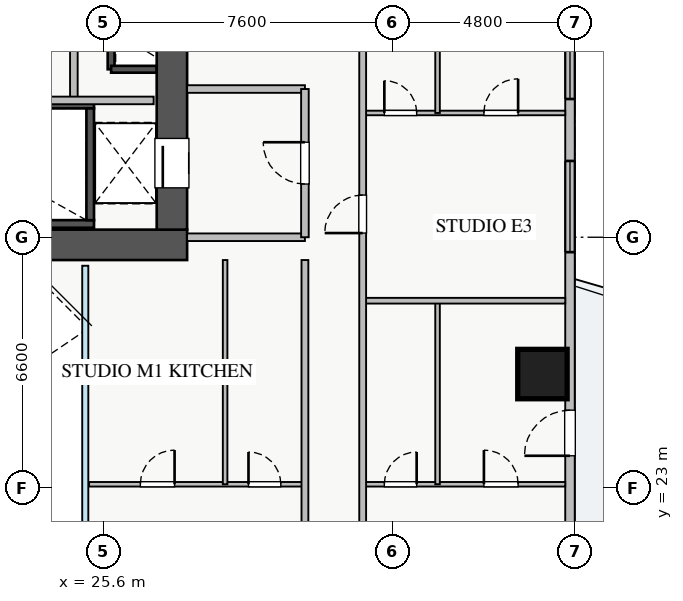
"""IFC4 building model, lengths in metres.
Left out: names, types, materials, properties, quantities, classifications, styles, units other than length and angle.
Written with IfcOpenShell. Run it as: python <this file> out.ifc"""

import sys

from ifc_helpers import new_model, si_unit, direction, frame, frame_2d, origin, origin_2d, place, context, subcontext, project, spatial, rectangle, extrude, source, transform, mapped, element, fill, save


model = new_model("IFC4")
c1 = context("Model", 3, precision=1e-05, world=origin(), true_north=direction((0.0, 1.0)))
c2 = subcontext(c1, "Body", "Model", "MODEL_VIEW")
j1 = project(units=[si_unit("LENGTHUNIT", "METRE"), si_unit("PLANEANGLEUNIT", "RADIAN")], contexts=[c1])
p1 = place(None, origin())
s1 = spatial("IfcSite", under=j1, at=p1, CompositionType="ELEMENT")
p2 = place(p1, origin())
s2 = spatial("IfcBuilding", under=s1, at=p2, CompositionType="ELEMENT")
p3 = place(p2, frame((0.0, 0.0, 36.0)))
s3 = spatial("IfcBuildingStorey", under=s2, at=p3, CompositionType="ELEMENT", Elevation=36.0)
p4 = place(p3, frame((25.8, 34.02, 0.0), z_axis=(0.0, 0.0, 1.0), x_axis=(0.0, 1.0, 0.0)))
e1 = element("IfcWall", 1, at=p4, inside=s3, PredefinedType="SHEAR", context=c2, shape_type="SweptSolid", body=[
    extrude(rectangle(XDim=1.06, YDim=0.18, at=frame_2d((0.53, 0.0))), origin(), (0.0, 0.0, 1.0), 3.07),
])
p5 = place(p3, frame((25.8, 34.02, 0.0), z_axis=(0.0, 0.0, 1.0), x_axis=(1.0, 0.0, 0.0)))
e2 = element("IfcWall", 2, at=p5, inside=s3, PredefinedType="SHEAR", context=c2, shape_type="SweptSolid", body=[
    extrude(rectangle(XDim=1.2, YDim=0.18, at=frame_2d((0.6, 0.0))), origin(), (0.0, 0.0, 1.0), 3.07),
])
p6 = place(p3, frame((18.2, 29.95, 0.0), z_axis=(0.0, 0.0, 1.0), x_axis=(1.0, 0.0, 0.0)))
e3 = element("IfcWall", 3, at=p6, inside=s3, PredefinedType="SHEAR", context=c2, shape_type="SweptSolid", body=[
    extrude(rectangle(XDim=7.15, YDim=0.2, at=frame_2d((3.575, 0.0))), origin(), (0.0, 0.0, 1.0), 3.25),
])
p7 = place(p3, frame((18.2, 33.09, 0.0), z_axis=(0.0, 0.0, 1.0), x_axis=(1.0, 0.0, 0.0)))
e4 = element("IfcWall", 4, at=p7, inside=s3, PredefinedType="SHEAR", context=c2, shape_type="SweptSolid", body=[
    extrude(rectangle(XDim=7.15, YDim=0.2, at=frame_2d((3.575, 0.0))), origin(), (0.0, 0.0, 1.0), 3.25),
])
p8 = place(p7, frame((0.35, 0.0, 0.0)))
e5 = element("IfcOpeningElement", 5, at=p8, cuts=e4, PredefinedType="OPENING", context=c2, shape_type="SweptSolid", body=[
    extrude(rectangle(XDim=1.1, YDim=2.05, at=frame_2d((0.55, 1.025))), frame((0.0, 0.11, 0.0), z_axis=(0.0, -1.0, 0.0), x_axis=(1.0, 0.0, 0.0)), (0.0, 0.0, 1.0), 0.22),
])
p9 = place(p3, frame((25.25, 30.05, 0.0), z_axis=(0.0, 0.0, 1.0), x_axis=(0.0, 1.0, 0.0)))
e6 = element("IfcWall", 6, at=p9, inside=s3, PredefinedType="SHEAR", context=c2, shape_type="SweptSolid", body=[
    extrude(rectangle(XDim=2.94, YDim=0.2, at=frame_2d((1.47, 0.0))), origin(), (0.0, 0.0, 1.0), 3.25),
])
p10 = place(p3, frame((10.2, 29.4, 0.0), z_axis=(0.0, 0.0, 1.0), x_axis=(1.0, 0.0, 0.0)))
e7 = element("IfcWall", 7, at=p10, inside=s3, PredefinedType="SHEAR", context=c2, shape_type="SweptSolid", body=[
    extrude(rectangle(XDim=17.6, YDim=0.8, at=frame_2d((8.8, 0.0))), origin(), (0.0, 0.0, 1.0), 3.25),
])
p11 = place(p3, frame((27.4, 29.8, 0.0), z_axis=(0.0, 0.0, 1.0), x_axis=(0.0, 1.0, 0.0)))
e8 = element("IfcWall", 8, at=p11, inside=s3, PredefinedType="SHEAR", context=c2, shape_type="SweptSolid", body=[
    extrude(rectangle(XDim=5.6, YDim=0.8, at=frame_2d((2.8, 0.0))), origin(), (0.0, 0.0, 1.0), 3.25),
])
p12 = place(p11, frame((1.1, 0.0, 0.0)))
e9 = element("IfcOpeningElement", 9, at=p12, cuts=e8, PredefinedType="OPENING", context=c2, shape_type="SweptSolid", body=[
    extrude(rectangle(XDim=1.3, YDim=2.05, at=frame_2d((0.65, 1.025))), frame((0.0, 0.41, 0.0), z_axis=(0.0, -1.0, 0.0), x_axis=(1.0, 0.0, 0.0)), (0.0, 0.0, 1.0), 0.82),
])
m1 = source(origin(), c2, "Body", "SweptSolid", [
    extrude(rectangle(XDim=1.3, YDim=1.3, at=origin_2d()), origin(), (0.0, 0.0, 1.0), 3.25),
])
p13 = place(p3, frame((37.15, 26.0, 0.0), z_axis=(0.0, 0.0, 1.0), x_axis=(1.0, 0.0, 0.0)))
e10 = element("IfcColumn", 10, at=p13, inside=s3, PredefinedType="COLUMN", context=c2, shape_type="MappedRepresentation", body=[
    mapped(m1, transform((0.0, 0.0, 0.0), x_axis=(1.0, 0.0, 0.0), y_axis=(0.0, 1.0, 0.0), z_axis=(0.0, 0.0, 1.0), scale=1.0)),
])
p14 = place(p3, frame((37.875, 9.45, 0.0), z_axis=(0.0, 0.0, 1.0), x_axis=(0.0, 1.0, 0.0)))
e11 = element("IfcWall", 11, at=p14, inside=s3, PredefinedType="STANDARD", context=c2, shape_type="SweptSolid", body=[
    extrude(rectangle(XDim=27.1, YDim=0.25, at=frame_2d((13.55, 0.0))), origin(), (0.0, 0.0, 1.0), 2.61),
])
p15 = place(p14, frame((14.4, 0.0, 0.0)))
e12 = element("IfcOpeningElement", 12, at=p15, cuts=e11, PredefinedType="OPENING", context=c2, shape_type="SweptSolid", body=[
    extrude(rectangle(XDim=1.2, YDim=2.1, at=frame_2d((0.6, 1.05))), frame((0.0, 0.135, 0.0), z_axis=(0.0, -1.0, 0.0), x_axis=(1.0, 0.0, 0.0)), (0.0, 0.0, 1.0), 0.27),
])
p16 = place(p14, frame((1.552, 0.0, 0.9)))
e13 = element("IfcOpeningElement", 13, at=p16, cuts=e11, PredefinedType="OPENING", context=c2, shape_type="SweptSolid", body=[
    extrude(rectangle(XDim=2.4, YDim=1.5, at=frame_2d((1.2, 0.75))), frame((0.0, 0.135, 0.0), z_axis=(0.0, -1.0, 0.0), x_axis=(1.0, 0.0, 0.0)), (0.0, 0.0, 1.0), 0.27),
])
p17 = place(p14, frame((23.788, 0.0, 0.9)))
e14 = element("IfcOpeningElement", 14, at=p17, cuts=e11, PredefinedType="OPENING", context=c2, shape_type="SweptSolid", body=[
    extrude(rectangle(XDim=1.8, YDim=1.5, at=frame_2d((0.9, 0.75))), frame((0.0, 0.135, 0.0), z_axis=(0.0, -1.0, 0.0), x_axis=(1.0, 0.0, 0.0)), (0.0, 0.0, 1.0), 0.27),
])
p18 = place(p14, frame((19.758, 0.0, 0.9)))
e15 = element("IfcOpeningElement", 15, at=p18, cuts=e11, PredefinedType="OPENING", context=c2, shape_type="SweptSolid", body=[
    extrude(rectangle(XDim=2.4, YDim=1.5, at=frame_2d((1.2, 0.75))), frame((0.0, 0.135, 0.0), z_axis=(0.0, -1.0, 0.0), x_axis=(1.0, 0.0, 0.0)), (0.0, 0.0, 1.0), 0.27),
])
p19 = place(p14, frame((8.755, 0.0, 0.9)))
e16 = element("IfcOpeningElement", 16, at=p19, cuts=e11, PredefinedType="OPENING", context=c2, shape_type="SweptSolid", body=[
    extrude(rectangle(XDim=0.9, YDim=1.2, at=frame_2d((0.45, 0.6))), frame((0.0, 0.135, 0.0), z_axis=(0.0, -1.0, 0.0), x_axis=(1.0, 0.0, 0.0)), (0.0, 0.0, 1.0), 0.27),
])
for number, where, z_axis, x_axis in (
    (17, (27.8, 29.6, 0.0), (0.0, 0.0, 1.0), (1.0, 0.0, 0.0)),
    (18, (27.8, 33.5, 0.0), (0.0, 0.0, 1.0), (1.0, 0.0, 0.0)),
):
    element("IfcWall", number, at=place(p3, frame(where, z_axis=z_axis, x_axis=x_axis)), inside=s3, PredefinedType="PARTITIONING", context=c2, shape_type="SweptSolid", body=[
        extrude(rectangle(XDim=3.1, YDim=0.2, at=frame_2d((1.55, 0.0))), origin(), (0.0, 0.0, 1.0), 3.07),
    ])
p20 = place(p3, frame((30.9, 29.6, 0.0), z_axis=(0.0, 0.0, 1.0), x_axis=(0.0, 1.0, 0.0)))
e19 = element("IfcWall", 19, at=p20, inside=s3, PredefinedType="PARTITIONING", context=c2, shape_type="SweptSolid", body=[
    extrude(rectangle(XDim=3.9, YDim=0.2, at=frame_2d((1.95, 0.0))), origin(), (0.0, 0.0, 1.0), 3.07),
])
p21 = place(p20, frame((1.4, 0.0, 0.0)))
e20 = element("IfcOpeningElement", 20, at=p21, cuts=e19, PredefinedType="OPENING", context=c2, shape_type="SweptSolid", body=[
    extrude(rectangle(XDim=1.1, YDim=2.05, at=frame_2d((0.55, 1.025))), frame((0.0, 0.11, 0.0), z_axis=(0.0, -1.0, 0.0), x_axis=(1.0, 0.0, 0.0)), (0.0, 0.0, 1.0), 0.22),
])
p22 = place(p3, frame((24.82, 33.2, 0.0), z_axis=(0.0, 0.0, 1.0), x_axis=(0.0, 1.0, 0.0)))
e21 = element("IfcWall", 21, at=p22, inside=s3, PredefinedType="PARTITIONING", context=c2, shape_type="SweptSolid", body=[
    extrude(rectangle(XDim=2.65, YDim=0.2, at=frame_2d((1.325, 0.0))), origin(), (0.0, 0.0, 1.0), 3.07),
])
p23 = place(p3, frame((21.75, 33.2, 0.0), z_axis=(0.0, 0.0, 1.0), x_axis=(1.0, 0.0, 0.0)))
e22 = element("IfcWall", 22, at=p23, inside=s3, PredefinedType="PARTITIONING", context=c2, shape_type="SweptSolid", body=[
    extrude(rectangle(XDim=5.17, YDim=0.2, at=frame_2d((2.585, 0.0))), origin(), (0.0, 0.0, 1.0), 3.07),
])
p24 = place(p3, frame((32.42, 23.1, 0.0), z_axis=(0.0, 0.0, 1.0), x_axis=(1.0, 0.0, 0.0)))
e23 = element("IfcWall", 23, at=p24, inside=s3, PredefinedType="PLUMBINGWALL", context=c2, shape_type="SweptSolid", body=[
    extrude(rectangle(XDim=5.33, YDim=0.12, at=frame_2d((2.665, 0.0))), origin(), (0.0, 0.0, 1.0), 3.07),
])
p25 = place(p24, frame((0.57, 0.0, 0.0)))
e24 = element("IfcOpeningElement", 24, at=p25, cuts=e23, PredefinedType="OPENING", context=c2, shape_type="SweptSolid", body=[
    extrude(rectangle(XDim=0.85, YDim=2.05, at=frame_2d((0.425, 1.025))), frame((0.0, 0.07, 0.0), z_axis=(0.0, -1.0, 0.0), x_axis=(1.0, 0.0, 0.0)), (0.0, 0.0, 1.0), 0.14),
])
p26 = place(p24, frame((3.19, 0.0, 0.0)))
e25 = element("IfcOpeningElement", 25, at=p26, cuts=e23, PredefinedType="OPENING", context=c2, shape_type="SweptSolid", body=[
    extrude(rectangle(XDim=0.9, YDim=2.05, at=frame_2d((0.45, 1.025))), frame((0.0, 0.07, 0.0), z_axis=(0.0, -1.0, 0.0), x_axis=(1.0, 0.0, 0.0)), (0.0, 0.0, 1.0), 0.14),
])
p27 = place(p3, frame((34.39, 23.1, 0.0), z_axis=(0.0, 0.0, 1.0), x_axis=(0.0, 1.0, 0.0)))
e26 = element("IfcWall", 26, at=p27, inside=s3, PredefinedType="PLUMBINGWALL", context=c2, shape_type="SweptSolid", body=[
    extrude(rectangle(XDim=4.83, YDim=0.12, at=frame_2d((2.415, 0.0))), origin(), (0.0, 0.0, 1.0), 3.07),
])
p28 = place(p3, frame((32.42, 32.87, 0.0), z_axis=(0.0, 0.0, 1.0), x_axis=(1.0, 0.0, 0.0)))
e27 = element("IfcWall", 27, at=p28, inside=s3, PredefinedType="PLUMBINGWALL", context=c2, shape_type="SweptSolid", body=[
    extrude(rectangle(XDim=5.33, YDim=0.12, at=frame_2d((2.665, 0.0))), origin(), (0.0, 0.0, 1.0), 3.07),
])
p29 = place(p28, frame((0.57, 0.0, 0.0)))
e28 = element("IfcOpeningElement", 28, at=p29, cuts=e27, PredefinedType="OPENING", context=c2, shape_type="SweptSolid", body=[
    extrude(rectangle(XDim=0.85, YDim=2.05, at=frame_2d((0.425, 1.025))), frame((0.0, 0.07, 0.0), z_axis=(0.0, -1.0, 0.0), x_axis=(1.0, 0.0, 0.0)), (0.0, 0.0, 1.0), 0.14),
])
p30 = place(p28, frame((3.19, 0.0, 0.0)))
e29 = element("IfcOpeningElement", 29, at=p30, cuts=e27, PredefinedType="OPENING", context=c2, shape_type="SweptSolid", body=[
    extrude(rectangle(XDim=0.9, YDim=2.05, at=frame_2d((0.45, 1.025))), frame((0.0, 0.07, 0.0), z_axis=(0.0, -1.0, 0.0), x_axis=(1.0, 0.0, 0.0)), (0.0, 0.0, 1.0), 0.14),
])
p31 = place(p3, frame((34.39, 32.87, 0.0), z_axis=(0.0, 0.0, 1.0), x_axis=(0.0, 1.0, 0.0)))
e30 = element("IfcWall", 30, at=p31, inside=s3, PredefinedType="PLUMBINGWALL", context=c2, shape_type="SweptSolid", body=[
    extrude(rectangle(XDim=4.21, YDim=0.12, at=frame_2d((2.105, 0.0))), origin(), (0.0, 0.0, 1.0), 3.07),
])
p32 = place(p3, frame((32.42, 27.93, 0.0), z_axis=(0.0, 0.0, 1.0), x_axis=(1.0, 0.0, 0.0)))
e31 = element("IfcWall", 31, at=p32, inside=s3, PredefinedType="PARTITIONING", context=c2, shape_type="SweptSolid", body=[
    extrude(rectangle(XDim=5.33, YDim=0.15, at=frame_2d((2.665, 0.0))), origin(), (0.0, 0.0, 1.0), 2.715),
])
p33 = place(p3, frame((32.42, 7.21, 0.0), z_axis=(0.0, 0.0, 1.0), x_axis=(0.0, 1.0, 0.0)))
e32 = element("IfcWall", 32, at=p33, inside=s3, PredefinedType="PARTITIONING", context=c2, shape_type="SweptSolid", body=[
    extrude(rectangle(XDim=31.23, YDim=0.18, at=frame_2d((15.615, 0.0))), origin(), (0.0, 0.0, 1.0), 2.815),
])
p34 = place(p33, frame((30.09, 0.0, 0.0)))
e33 = element("IfcOpeningElement", 33, at=p34, cuts=e32, PredefinedType="OPENING", context=c2, shape_type="SweptSolid", body=[
    extrude(rectangle(XDim=0.9, YDim=2.05, at=frame_2d((0.45, 1.025))), frame((0.0, 0.1, 0.0), z_axis=(0.0, -1.0, 0.0), x_axis=(1.0, 0.0, 0.0)), (0.0, 0.0, 1.0), 0.2),
])
p35 = place(p33, frame((0.415, 0.0, 0.0)))
e34 = element("IfcOpeningElement", 34, at=p35, cuts=e32, PredefinedType="OPENING", context=c2, shape_type="SweptSolid", body=[
    extrude(rectangle(XDim=0.9, YDim=2.05, at=frame_2d((0.45, 1.025))), frame((0.0, 0.1, 0.0), z_axis=(0.0, -1.0, 0.0), x_axis=(1.0, 0.0, 0.0)), (0.0, 0.0, 1.0), 0.2),
])
p36 = place(p33, frame((3.465, 0.0, 0.0)))
e35 = element("IfcOpeningElement", 35, at=p36, cuts=e32, PredefinedType="OPENING", context=c2, shape_type="SweptSolid", body=[
    extrude(rectangle(XDim=1.0, YDim=2.05, at=frame_2d((0.5, 1.025))), frame((0.0, 0.1, 0.0), z_axis=(0.0, -1.0, 0.0), x_axis=(1.0, 0.0, 0.0)), (0.0, 0.0, 1.0), 0.2),
])
p37 = place(p33, frame((12.635, 0.0, 0.0)))
e36 = element("IfcOpeningElement", 36, at=p37, cuts=e32, PredefinedType="OPENING", context=c2, shape_type="SweptSolid", body=[
    extrude(rectangle(XDim=1.0, YDim=2.05, at=frame_2d((0.5, 1.025))), frame((0.0, 0.1, 0.0), z_axis=(0.0, -1.0, 0.0), x_axis=(1.0, 0.0, 0.0)), (0.0, 0.0, 1.0), 0.2),
])
p38 = place(p33, frame((22.5, 0.0, 0.0)))
e37 = element("IfcOpeningElement", 37, at=p38, cuts=e32, PredefinedType="OPENING", context=c2, shape_type="SweptSolid", body=[
    extrude(rectangle(XDim=1.0, YDim=2.05, at=frame_2d((0.5, 1.025))), frame((0.0, 0.1, 0.0), z_axis=(0.0, -1.0, 0.0), x_axis=(1.0, 0.0, 0.0)), (0.0, 0.0, 1.0), 0.2),
])
p39 = place(p3, frame((25.22, 23.1, 0.0), z_axis=(0.0, 0.0, 1.0), x_axis=(1.0, 0.0, 0.0)))
e38 = element("IfcWall", 38, at=p39, inside=s3, PredefinedType="PLUMBINGWALL", context=c2, shape_type="SweptSolid", body=[
    extrude(rectangle(XDim=5.68, YDim=0.12, at=frame_2d((2.84, 0.0))), origin(), (0.0, 0.0, 1.0), 3.07),
])
p40 = place(p39, frame((1.35, 0.0, 0.0)))
e39 = element("IfcOpeningElement", 39, at=p40, cuts=e38, PredefinedType="OPENING", context=c2, shape_type="SweptSolid", body=[
    extrude(rectangle(XDim=0.9, YDim=2.05, at=frame_2d((0.45, 1.025))), frame((0.0, 0.07, 0.0), z_axis=(0.0, -1.0, 0.0), x_axis=(1.0, 0.0, 0.0)), (0.0, 0.0, 1.0), 0.14),
])
p41 = place(p39, frame((4.195, 0.0, 0.0)))
e40 = element("IfcOpeningElement", 40, at=p41, cuts=e38, PredefinedType="OPENING", context=c2, shape_type="SweptSolid", body=[
    extrude(rectangle(XDim=0.85, YDim=2.05, at=frame_2d((0.425, 1.025))), frame((0.0, 0.07, 0.0), z_axis=(0.0, -1.0, 0.0), x_axis=(1.0, 0.0, 0.0)), (0.0, 0.0, 1.0), 0.14),
])
p42 = place(p3, frame((28.8, 23.1, 0.0), z_axis=(0.0, 0.0, 1.0), x_axis=(0.0, 1.0, 0.0)))
e41 = element("IfcWall", 41, at=p42, inside=s3, PredefinedType="PLUMBINGWALL", context=c2, shape_type="SweptSolid", body=[
    extrude(rectangle(XDim=5.9, YDim=0.12, at=frame_2d((2.95, 0.0))), origin(), (0.0, 0.0, 1.0), 3.07),
])
p43 = place(p3, frame((30.9, 17.0, 0.0), z_axis=(0.0, 0.0, 1.0), x_axis=(0.0, 1.0, 0.0)))
e42 = element("IfcWall", 42, at=p43, inside=s3, PredefinedType="PARTITIONING", context=c2, shape_type="SweptSolid", body=[
    extrude(rectangle(XDim=12.0, YDim=0.18, at=frame_2d((6.0, 0.0))), origin(), (0.0, 0.0, 1.0), 3.07),
])
p44 = place(p43, frame((2.36, 0.0, 0.0)))
e43 = element("IfcOpeningElement", 43, at=p44, cuts=e42, PredefinedType="OPENING", context=c2, shape_type="SweptSolid", body=[
    extrude(rectangle(XDim=1.0, YDim=2.05, at=frame_2d((0.5, 1.025))), frame((0.0, 0.1, 0.0), z_axis=(0.0, -1.0, 0.0), x_axis=(1.0, 0.0, 0.0)), (0.0, 0.0, 1.0), 0.2),
])
m2 = source(origin(), c2, "Body", "SweptSolid", [
    extrude(rectangle(XDim=1.2, YDim=2.1, at=frame_2d((0.6, 1.05))), frame((0.0, 0.025, 0.0), z_axis=(0.0, -1.0, 0.0), x_axis=(1.0, 0.0, 0.0)), (0.0, 0.0, 1.0), 0.05),
])
p45 = place(p15, origin())
e44 = element("IfcDoor", 44, at=p45, inside=s3, OperationType="SINGLE_SWING_LEFT", PredefinedType="DOOR", context=c2, shape_type="MappedRepresentation", body=[
    mapped(m2, transform((0.0, 0.0, 0.0), x_axis=(1.0, 0.0, 0.0), y_axis=(0.0, 1.0, 0.0), z_axis=(0.0, 0.0, 1.0), scale=1.0)),
])
fill(e12, e44)
m3 = source(origin(), c2, "Body", "SweptSolid", [
    extrude(rectangle(XDim=1.8, YDim=1.5, at=frame_2d((0.9, 0.75))), frame((0.0, 0.03, 0.0), z_axis=(0.0, -1.0, 0.0), x_axis=(1.0, 0.0, 0.0)), (0.0, 0.0, 1.0), 0.06),
])
p46 = place(p17, origin())
e45 = element("IfcWindow", 45, at=p46, inside=s3, PartitioningType="TRIPLE_PANEL_VERTICAL", PredefinedType="WINDOW", context=c2, shape_type="MappedRepresentation", body=[
    mapped(m3, transform((0.0, 0.0, 0.0), x_axis=(1.0, 0.0, 0.0), y_axis=(0.0, 1.0, 0.0), z_axis=(0.0, 0.0, 1.0), scale=1.0)),
])
fill(e14, e45)
m4 = source(origin(), c2, "Body", "SweptSolid", [
    extrude(rectangle(XDim=1.3, YDim=2.05, at=frame_2d((0.65, 1.025))), frame((0.0, 0.025, 0.0), z_axis=(0.0, -1.0, 0.0), x_axis=(1.0, 0.0, 0.0)), (0.0, 0.0, 1.0), 0.05),
])
p47 = place(p12, origin())
e46 = element("IfcDoor", 46, at=p47, inside=s3, OperationType="SLIDING_TO_LEFT", PredefinedType="DOOR", context=c2, shape_type="MappedRepresentation", body=[
    mapped(m4, transform((0.0, 0.0, 0.0), x_axis=(1.0, 0.0, 0.0), y_axis=(0.0, 1.0, 0.0), z_axis=(0.0, 0.0, 1.0), scale=1.0)),
])
fill(e9, e46)
m5 = source(origin(), c2, "Body", "SweptSolid", [
    extrude(rectangle(XDim=1.1, YDim=2.05, at=frame_2d((0.55, 1.025))), frame((0.0, 0.025, 0.0), z_axis=(0.0, -1.0, 0.0), x_axis=(1.0, 0.0, 0.0)), (0.0, 0.0, 1.0), 0.05),
])
p48 = place(p21, origin())
e47 = element("IfcDoor", 47, at=p48, inside=s3, OperationType="SINGLE_SWING_RIGHT", PredefinedType="DOOR", context=c2, shape_type="MappedRepresentation", body=[
    mapped(m5, transform((0.0, 0.0, 0.0), x_axis=(1.0, 0.0, 0.0), y_axis=(0.0, 1.0, 0.0), z_axis=(0.0, 0.0, 1.0), scale=1.0)),
])
fill(e20, e47)
m6 = source(origin(), c2, "Body", "SweptSolid", [
    extrude(rectangle(XDim=0.85, YDim=2.05, at=frame_2d((0.425, 1.025))), frame((0.0, 0.025, 0.0), z_axis=(0.0, -1.0, 0.0), x_axis=(1.0, 0.0, 0.0)), (0.0, 0.0, 1.0), 0.05),
])
p49 = place(p25, origin())
e48 = element("IfcDoor", 48, at=p49, inside=s3, OperationType="SINGLE_SWING_RIGHT", PredefinedType="DOOR", context=c2, shape_type="MappedRepresentation", body=[
    mapped(m6, transform((0.0, 0.0, 0.0), x_axis=(1.0, 0.0, 0.0), y_axis=(0.0, 1.0, 0.0), z_axis=(0.0, 0.0, 1.0), scale=1.0)),
])
fill(e24, e48)
m7 = source(origin(), c2, "Body", "SweptSolid", [
    extrude(rectangle(XDim=0.9, YDim=2.05, at=frame_2d((0.45, 1.025))), frame((0.0, 0.025, 0.0), z_axis=(0.0, -1.0, 0.0), x_axis=(1.0, 0.0, 0.0)), (0.0, 0.0, 1.0), 0.05),
])
p50 = place(p26, origin())
e49 = element("IfcDoor", 49, at=p50, inside=s3, OperationType="SINGLE_SWING_LEFT", PredefinedType="DOOR", context=c2, shape_type="MappedRepresentation", body=[
    mapped(m7, transform((0.0, 0.0, 0.0), x_axis=(1.0, 0.0, 0.0), y_axis=(0.0, 1.0, 0.0), z_axis=(0.0, 0.0, 1.0), scale=1.0)),
])
fill(e25, e49)
p51 = place(p29, origin())
e50 = element("IfcDoor", 50, at=p51, inside=s3, OperationType="SINGLE_SWING_LEFT", PredefinedType="DOOR", context=c2, shape_type="MappedRepresentation", body=[
    mapped(m6, transform((0.0, 0.0, 0.0), x_axis=(1.0, 0.0, 0.0), y_axis=(0.0, 1.0, 0.0), z_axis=(0.0, 0.0, 1.0), scale=1.0)),
])
fill(e28, e50)
p52 = place(p30, origin())
e51 = element("IfcDoor", 51, at=p52, inside=s3, OperationType="SINGLE_SWING_RIGHT", PredefinedType="DOOR", context=c2, shape_type="MappedRepresentation", body=[
    mapped(m7, transform((0.0, 0.0, 0.0), x_axis=(1.0, 0.0, 0.0), y_axis=(0.0, 1.0, 0.0), z_axis=(0.0, 0.0, 1.0), scale=1.0)),
])
fill(e29, e51)
m8 = source(origin(), c2, "Body", "SweptSolid", [
    extrude(rectangle(XDim=1.0, YDim=2.05, at=frame_2d((0.5, 1.025))), frame((0.0, 0.025, 0.0), z_axis=(0.0, -1.0, 0.0), x_axis=(1.0, 0.0, 0.0)), (0.0, 0.0, 1.0), 0.05),
])
p53 = place(p38, origin())
e52 = element("IfcDoor", 52, at=p53, inside=s3, OperationType="SINGLE_SWING_LEFT", PredefinedType="DOOR", context=c2, shape_type="MappedRepresentation", body=[
    mapped(m8, transform((0.0, 0.0, 0.0), x_axis=(1.0, 0.0, 0.0), y_axis=(0.0, 1.0, 0.0), z_axis=(0.0, 0.0, 1.0), scale=1.0)),
])
fill(e37, e52)
p54 = place(p40, origin())
e53 = element("IfcDoor", 53, at=p54, inside=s3, OperationType="SINGLE_SWING_RIGHT", PredefinedType="DOOR", context=c2, shape_type="MappedRepresentation", body=[
    mapped(m7, transform((0.0, 0.0, 0.0), x_axis=(1.0, 0.0, 0.0), y_axis=(0.0, 1.0, 0.0), z_axis=(0.0, 0.0, 1.0), scale=1.0)),
])
fill(e39, e53)
p55 = place(p41, origin())
e54 = element("IfcDoor", 54, at=p55, inside=s3, OperationType="SINGLE_SWING_LEFT", PredefinedType="DOOR", context=c2, shape_type="MappedRepresentation", body=[
    mapped(m6, transform((0.0, 0.0, 0.0), x_axis=(1.0, 0.0, 0.0), y_axis=(0.0, 1.0, 0.0), z_axis=(0.0, 0.0, 1.0), scale=1.0)),
])
fill(e40, e54)
m9 = source(origin(), c2, "Body", "SweptSolid", [
    extrude(rectangle(XDim=2.4, YDim=1.5, at=frame_2d((1.2, 0.75))), frame((0.0, 0.03, 0.0), z_axis=(0.0, -1.0, 0.0), x_axis=(1.0, 0.0, 0.0)), (0.0, 0.0, 1.0), 0.06),
])
p56 = place(p18, origin())
e55 = element("IfcWindow", 55, at=p56, inside=s3, PartitioningType="TRIPLE_PANEL_VERTICAL", PredefinedType="WINDOW", context=c2, shape_type="MappedRepresentation", body=[
    mapped(m9, transform((0.0, 0.0, 0.0), x_axis=(1.0, 0.0, 0.0), y_axis=(0.0, 1.0, 0.0), z_axis=(0.0, 0.0, 1.0), scale=1.0)),
])
fill(e15, e55)
save(model, sys.argv[1])
